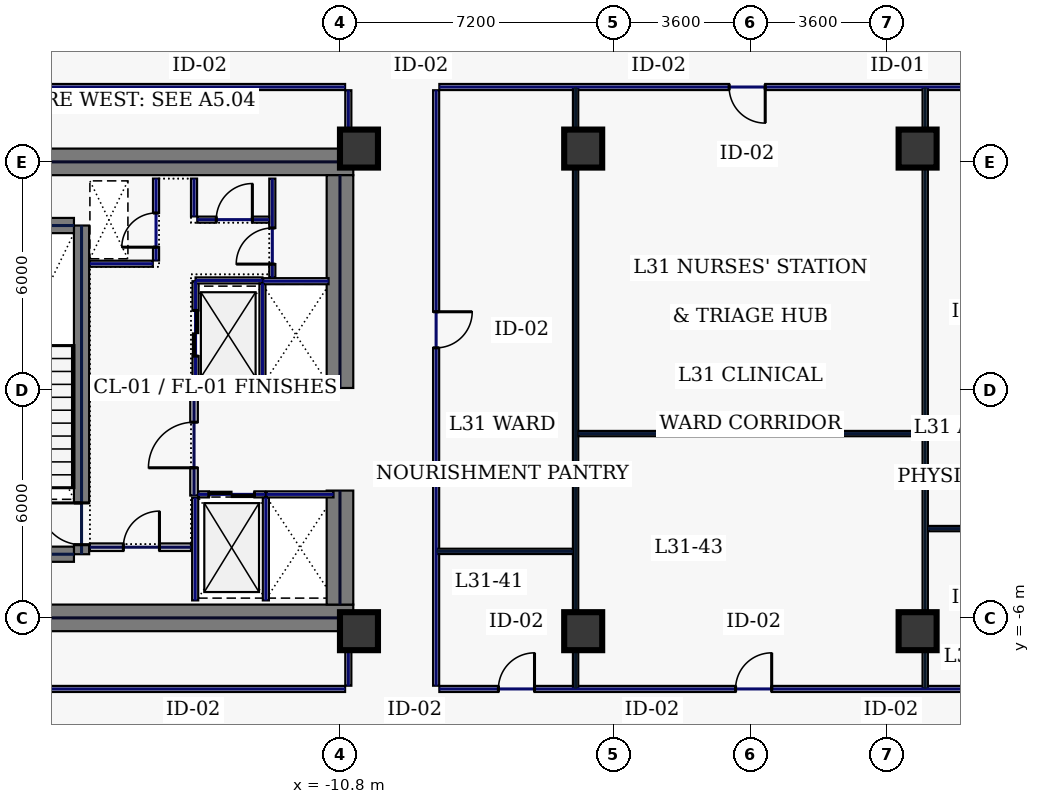
"""IFC4 building model, lengths in metres.
Left out: names, types, materials, properties, quantities, classifications, styles, units other than length and angle.
Written with IfcOpenShell. Run it as: python <this file> out.ifc"""

import sys

from ifc_helpers import new_model, si_unit, direction, frame, frame_2d, origin, origin_2d, place, context, subcontext, project, spatial, rectangle, hollow_rectangle, extrude, element, fill, save


model = new_model("IFC4")
c1 = context("Model", 3, precision=1e-05, world=origin(), true_north=direction((0.0, 1.0)))
c2 = subcontext(c1, "Body", "Model", "MODEL_VIEW")
j1 = project(units=[si_unit("LENGTHUNIT", "METRE"), si_unit("PLANEANGLEUNIT", "RADIAN")], contexts=[c1])
p1 = place(None, origin())
s1 = spatial("IfcSite", under=j1, at=p1, CompositionType="ELEMENT")
p2 = place(p1, origin())
s2 = spatial("IfcBuilding", under=s1, at=p2, CompositionType="ELEMENT")
p3 = place(p2, frame((0.0, 0.0, 137.4)))
s3 = spatial("IfcBuildingStorey", under=s2, at=p3, CompositionType="ELEMENT", Elevation=137.4)
for number, where, z_axis, x_axis in (
    (1, (-22.0, 6.0, 0.0), (0.0, 0.0, 1.0), (1.0, 0.0, 0.0)),
    (2, (-22.0, -6.0, 0.0), (0.0, 0.0, 1.0), (1.0, 0.0, 0.0)),
):
    element("IfcWall", number, at=place(p3, frame(where, z_axis=z_axis, x_axis=x_axis)), inside=s3, PredefinedType="SHEAR", context=c2, shape_type="SweptSolid", body=[
        extrude(rectangle(XDim=11.55, YDim=0.7, at=frame_2d((5.775, 0.0))), origin(), (0.0, 0.0, 1.0), 3.74),
    ])
p4 = place(p3, frame((-10.8, -5.65, 0.0), z_axis=(0.0, 0.0, 1.0), x_axis=(0.0, 1.0, 0.0)))
e3 = element("IfcWall", 3, at=p4, inside=s3, PredefinedType="SHEAR", context=c2, shape_type="SweptSolid", body=[
    extrude(rectangle(XDim=3.0, YDim=0.7, at=frame_2d((1.5, 0.0))), origin(), (0.0, 0.0, 1.0), 3.74),
])
p5 = place(p3, frame((-10.8, 0.05, 0.0), z_axis=(0.0, 0.0, 1.0), x_axis=(0.0, 1.0, 0.0)))
e4 = element("IfcWall", 4, at=p5, inside=s3, PredefinedType="SHEAR", context=c2, shape_type="SweptSolid", body=[
    extrude(rectangle(XDim=5.6, YDim=0.7, at=frame_2d((2.8, 0.0))), origin(), (0.0, 0.0, 1.0), 3.74),
])
p6 = place(p3, frame((-17.6, -4.325, 0.0), z_axis=(0.0, 0.0, 1.0), x_axis=(0.0, 1.0, 0.0)))
e5 = element("IfcWall", 5, at=p6, inside=s3, PredefinedType="SHEAR", context=c2, shape_type="SweptSolid", body=[
    extrude(rectangle(XDim=8.65, YDim=0.4, at=frame_2d((4.325, 0.0))), origin(), (0.0, 0.0, 1.0), 3.74),
])
p7 = place(p6, frame((0.25, 0.0, 0.0)))
e6 = element("IfcOpeningElement", 6, at=p7, cuts=e5, PredefinedType="OPENING", context=c2, shape_type="SweptSolid", body=[
    extrude(rectangle(XDim=1.1, YDim=2.2, at=frame_2d((0.55, 1.1))), frame((0.0, 0.21, 0.0), z_axis=(0.0, -1.0, 0.0), x_axis=(1.0, 0.0, 0.0)), (0.0, 0.0, 1.0), 0.42),
])
for number, where, z_axis, x_axis in (
    (7, (-21.2, -4.325, 0.0), (0.0, 0.0, 1.0), (1.0, 0.0, 0.0)),
    (8, (-21.2, 4.325, 0.0), (0.0, 0.0, 1.0), (1.0, 0.0, 0.0)),
):
    element("IfcWall", number, at=place(p3, frame(where, z_axis=z_axis, x_axis=x_axis)), inside=s3, PredefinedType="SHEAR", context=c2, shape_type="SweptSolid", body=[
        extrude(rectangle(XDim=3.4, YDim=0.4, at=frame_2d((1.7, 0.0))), origin(), (0.0, 0.0, 1.0), 3.74),
    ])
for number, where, z_axis, x_axis in (
    (9, (-10.3, -6.35, 0.0), (0.0, 0.0, 1.0), (1.0, 0.0, 0.0)),
    (10, (-10.3, 6.35, 0.0), (0.0, 0.0, 1.0), (1.0, 0.0, 0.0)),
    (11, (-4.4, -6.35, 0.0), (0.0, 0.0, 1.0), (1.0, 0.0, 0.0)),
    (12, (4.4, -6.35, 0.0), (0.0, 0.0, 1.0), (1.0, 0.0, 0.0)),
    (13, (-4.4, 6.35, 0.0), (0.0, 0.0, 1.0), (1.0, 0.0, 0.0)),
    (14, (4.4, 6.35, 0.0), (0.0, 0.0, 1.0), (1.0, 0.0, 0.0)),
):
    element("IfcColumn", number, at=place(p3, frame(where, z_axis=z_axis, x_axis=x_axis)), inside=s3, PredefinedType="COLUMN", context=c2, shape_type="SweptSolid", body=[
        extrude(hollow_rectangle(XDim=1.0, YDim=1.0, WallThickness=0.045, at=origin_2d()), origin(), (0.0, 0.0, 1.0), 3.74),
    ])
p8 = place(p3, frame((-14.6, 0.12, 0.0), z_axis=(0.0, 0.0, 1.0), x_axis=(0.0, 1.0, 0.0)))
e15 = element("IfcWall", 15, at=p8, inside=s3, PredefinedType="PARTITIONING", context=c2, shape_type="SweptSolid", body=[
    extrude(rectangle(XDim=2.74, YDim=0.16, at=frame_2d((1.37, 0.0))), origin(), (0.0, 0.0, 1.0), 3.74),
])
p9 = place(p8, frame((0.77, 0.0, 0.0)))
e16 = element("IfcOpeningElement", 16, at=p9, cuts=e15, PredefinedType="OPENING", context=c2, shape_type="SweptSolid", body=[
    extrude(rectangle(XDim=1.2, YDim=2.2, at=frame_2d((0.6, 1.1))), frame((0.0, 0.09, 0.0), z_axis=(0.0, -1.0, 0.0), x_axis=(1.0, 0.0, 0.0)), (0.0, 0.0, 1.0), 0.18),
])
for number, where, z_axis, x_axis in (
    (17, (-14.6, 0.1, 0.0), (0.0, 0.0, 1.0), (1.0, 0.0, 0.0)),
    (18, (-14.6, 2.88, 0.0), (0.0, 0.0, 1.0), (1.0, 0.0, 0.0)),
):
    element("IfcWall", number, at=place(p3, frame(where, z_axis=z_axis, x_axis=x_axis)), inside=s3, PredefinedType="PARTITIONING", context=c2, shape_type="SweptSolid", body=[
        extrude(rectangle(XDim=1.76, YDim=0.16, at=frame_2d((0.88, 0.0))), origin(), (0.0, 0.0, 1.0), 3.74),
    ])
p10 = place(p3, frame((-12.84, 0.18, 0.0), z_axis=(0.0, 0.0, 1.0), x_axis=(0.0, 1.0, 0.0)))
e19 = element("IfcWall", 19, at=p10, inside=s3, PredefinedType="PARTITIONING", context=c2, shape_type="SweptSolid", body=[
    extrude(rectangle(XDim=2.62, YDim=0.16, at=frame_2d((1.31, 0.0))), origin(), (0.0, 0.0, 1.0), 3.74),
])
p11 = place(p3, frame((-14.53, -2.75, 0.0), z_axis=(0.0, 0.0, 1.0), x_axis=(1.0, 0.0, 0.0)))
e20 = element("IfcWall", 20, at=p11, inside=s3, PredefinedType="PARTITIONING", context=c2, shape_type="SweptSolid", body=[
    extrude(rectangle(XDim=1.76, YDim=0.16, at=frame_2d((0.88, 0.0))), origin(), (0.0, 0.0, 1.0), 3.74),
])
p12 = place(p11, frame((0.28, 0.0, 0.0)))
e21 = element("IfcOpeningElement", 21, at=p12, cuts=e20, PredefinedType="OPENING", context=c2, shape_type="SweptSolid", body=[
    extrude(rectangle(XDim=1.2, YDim=2.2, at=frame_2d((0.6, 1.1))), frame((0.0, 0.09, 0.0), z_axis=(0.0, -1.0, 0.0), x_axis=(1.0, 0.0, 0.0)), (0.0, 0.0, 1.0), 0.18),
])
for number, where, z_axis, x_axis in (
    (22, (-12.75, -5.54, 0.0), (0.0, 0.0, 1.0), (0.0, 1.0, 0.0)),
    (23, (-14.61, -5.54, 0.0), (0.0, 0.0, 1.0), (0.0, 1.0, 0.0)),
):
    element("IfcWall", number, at=place(p3, frame(where, z_axis=z_axis, x_axis=x_axis)), inside=s3, PredefinedType="PARTITIONING", context=c2, shape_type="SweptSolid", body=[
        extrude(rectangle(XDim=2.7, YDim=0.16, at=frame_2d((1.35, 0.0))), origin(), (0.0, 0.0, 1.0), 3.74),
    ])
p13 = place(p3, frame((-12.73, -2.75, 0.0), z_axis=(0.0, 0.0, 1.0), x_axis=(1.0, 0.0, 0.0)))
e24 = element("IfcWall", 24, at=p13, inside=s3, PredefinedType="PARTITIONING", context=c2, shape_type="SweptSolid", body=[
    extrude(rectangle(XDim=1.76, YDim=0.16, at=frame_2d((0.88, 0.0))), origin(), (0.0, 0.0, 1.0), 3.74),
])
for number, where, z_axis, x_axis in (
    (25, (-12.82, 0.06, 0.0), (0.0, 0.0, 1.0), (1.0, 0.0, 0.0)),
    (26, (-12.82, 2.86, 0.0), (0.0, 0.0, 1.0), (1.0, 0.0, 0.0)),
):
    element("IfcWall", number, at=place(p3, frame(where, z_axis=z_axis, x_axis=x_axis)), inside=s3, PredefinedType="PARTITIONING", context=c2, shape_type="SweptSolid", body=[
        extrude(rectangle(XDim=1.72, YDim=0.16, at=frame_2d((0.86, 0.0))), origin(), (0.0, 0.0, 1.0), 3.74),
    ])
p14 = place(p3, frame((-15.64, 3.405, 0.0), z_axis=(0.0, 0.0, 1.0), x_axis=(0.0, 1.0, 0.0)))
e27 = element("IfcWall", 27, at=p14, inside=s3, PredefinedType="PARTITIONING", context=c2, shape_type="SweptSolid", body=[
    extrude(rectangle(XDim=2.155, YDim=0.16, at=frame_2d((1.078, 0.0))), origin(), (0.0, 0.0, 1.0), 3.74),
])
p15 = place(p14, frame((0.35, 0.0, 0.0)))
e28 = element("IfcOpeningElement", 28, at=p15, cuts=e27, PredefinedType="OPENING", context=c2, shape_type="SweptSolid", body=[
    extrude(rectangle(XDim=0.9, YDim=2.2, at=frame_2d((0.45, 1.1))), frame((0.0, 0.09, 0.0), z_axis=(0.0, -1.0, 0.0), x_axis=(1.0, 0.0, 0.0)), (0.0, 0.0, 1.0), 0.18),
])
p16 = place(p3, frame((-17.38, 3.32, 0.0), z_axis=(0.0, 0.0, 1.0), x_axis=(1.0, 0.0, 0.0)))
e29 = element("IfcWall", 29, at=p16, inside=s3, PredefinedType="PARTITIONING", context=c2, shape_type="SweptSolid", body=[
    extrude(rectangle(XDim=1.655, YDim=0.16, at=frame_2d((0.827, 0.0))), origin(), (0.0, 0.0, 1.0), 3.74),
])
p17 = place(p3, frame((-17.38, -4.14, 0.0), z_axis=(0.0, 0.0, 1.0), x_axis=(1.0, 0.0, 0.0)))
e30 = element("IfcWall", 30, at=p17, inside=s3, PredefinedType="SOLIDWALL", context=c2, shape_type="SweptSolid", body=[
    extrude(rectangle(XDim=2.66, YDim=0.2, at=frame_2d((1.33, 0.0))), origin(), (0.0, 0.0, 1.0), 3.74),
])
p18 = place(p17, frame((0.88, 0.0, 0.0)))
e31 = element("IfcOpeningElement", 31, at=p18, cuts=e30, PredefinedType="OPENING", context=c2, shape_type="SweptSolid", body=[
    extrude(rectangle(XDim=0.95, YDim=2.2, at=frame_2d((0.475, 1.1))), frame((0.0, 0.11, 0.0), z_axis=(0.0, -1.0, 0.0), x_axis=(1.0, 0.0, 0.0)), (0.0, 0.0, 1.0), 0.22),
])
p19 = place(p3, frame((-12.58, 2.96, 0.0), z_axis=(0.0, 0.0, 1.0), x_axis=(0.0, 1.0, 0.0)))
e32 = element("IfcWall", 32, at=p19, inside=s3, PredefinedType="PARTITIONING", context=c2, shape_type="SweptSolid", body=[
    extrude(rectangle(XDim=2.6, YDim=0.16, at=frame_2d((1.3, 0.0))), origin(), (0.0, 0.0, 1.0), 3.74),
])
p20 = place(p19, frame((0.35, 0.0, 0.0)))
e33 = element("IfcOpeningElement", 33, at=p20, cuts=e32, PredefinedType="OPENING", context=c2, shape_type="SweptSolid", body=[
    extrude(rectangle(XDim=0.95, YDim=2.2, at=frame_2d((0.475, 1.1))), frame((0.0, 0.09, 0.0), z_axis=(0.0, -1.0, 0.0), x_axis=(1.0, 0.0, 0.0)), (0.0, 0.0, 1.0), 0.18),
])
p21 = place(p3, frame((-14.555, 4.48, 0.0), z_axis=(0.0, 0.0, 1.0), x_axis=(1.0, 0.0, 0.0)))
e34 = element("IfcWall", 34, at=p21, inside=s3, PredefinedType="PARTITIONING", context=c2, shape_type="SweptSolid", body=[
    extrude(rectangle(XDim=1.89, YDim=0.16, at=frame_2d((0.945, 0.0))), origin(), (0.0, 0.0, 1.0), 3.74),
])
p22 = place(p21, frame((0.5, 0.0, 0.0)))
e35 = element("IfcOpeningElement", 35, at=p22, cuts=e34, PredefinedType="OPENING", context=c2, shape_type="SweptSolid", body=[
    extrude(rectangle(XDim=0.95, YDim=2.2, at=frame_2d((0.475, 1.1))), frame((0.0, 0.09, 0.0), z_axis=(0.0, -1.0, 0.0), x_axis=(1.0, 0.0, 0.0)), (0.0, 0.0, 1.0), 0.18),
])
p23 = place(p3, frame((-14.64, 4.565, 0.0), z_axis=(0.0, 0.0, 1.0), x_axis=(0.0, 1.0, 0.0)))
e36 = element("IfcWall", 36, at=p23, inside=s3, PredefinedType="PARTITIONING", context=c2, shape_type="SweptSolid", body=[
    extrude(rectangle(XDim=0.995, YDim=0.16, at=frame_2d((0.498, 0.0))), origin(), (0.0, 0.0, 1.0), 3.74),
])
p24 = place(p3, frame((-14.64, -2.78, 0.0), z_axis=(0.0, 0.0, 1.0), x_axis=(0.0, 1.0, 0.0)))
e37 = element("IfcWall", 37, at=p24, inside=s3, PredefinedType="SOLIDWALL", context=c2, shape_type="SweptSolid", body=[
    extrude(rectangle(XDim=2.82, YDim=0.2, at=frame_2d((1.41, 0.0))), origin(), (0.0, 0.0, 1.0), 3.74),
])
p25 = place(p24, frame((0.73, 0.0, 0.0)))
e38 = element("IfcOpeningElement", 38, at=p25, cuts=e37, PredefinedType="OPENING", context=c2, shape_type="SweptSolid", body=[
    extrude(rectangle(XDim=1.2, YDim=2.2, at=frame_2d((0.6, 1.1))), frame((0.0, 0.11, 0.0), z_axis=(0.0, -1.0, 0.0), x_axis=(1.0, 0.0, 0.0)), (0.0, 0.0, 1.0), 0.22),
])
p26 = place(p3, frame((8.185, 7.97, 0.0), z_axis=(0.0, 0.0, 1.0), x_axis=(-1.0, 0.0, 0.0)))
e39 = element("IfcWall", 39, at=p26, inside=s3, PredefinedType="PARTITIONING", context=c2, shape_type="SweptSolid", body=[
    extrude(rectangle(XDim=16.37, YDim=0.16, at=frame_2d((8.185, 0.0))), origin(), (0.0, 0.0, 1.0), 3.74),
])
p27 = place(p26, frame((7.795, 0.0, 0.0)))
e40 = element("IfcOpeningElement", 40, at=p27, cuts=e39, PredefinedType="OPENING", context=c2, shape_type="SweptSolid", body=[
    extrude(rectangle(XDim=0.95, YDim=2.2, at=frame_2d((0.475, 1.1))), frame((0.0, 0.09, 0.0), z_axis=(0.0, -1.0, 0.0), x_axis=(1.0, 0.0, 0.0)), (0.0, 0.0, 1.0), 0.18),
])
p28 = place(p3, frame((-8.27, 7.885, 0.0), z_axis=(0.0, 0.0, 1.0), x_axis=(0.0, -1.0, 0.0)))
e41 = element("IfcWall", 41, at=p28, inside=s3, PredefinedType="PARTITIONING", context=c2, shape_type="SweptSolid", body=[
    extrude(rectangle(XDim=15.67, YDim=0.16, at=frame_2d((7.835, 0.0))), origin(), (0.0, 0.0, 1.0), 3.74),
])
p29 = place(p28, frame((5.829, 0.0, 0.0)))
e42 = element("IfcOpeningElement", 42, at=p29, cuts=e41, PredefinedType="OPENING", context=c2, shape_type="SweptSolid", body=[
    extrude(rectangle(XDim=0.95, YDim=2.2, at=frame_2d((0.475, 1.1))), frame((0.0, 0.09, 0.0), z_axis=(0.0, -1.0, 0.0), x_axis=(1.0, 0.0, 0.0)), (0.0, 0.0, 1.0), 0.18),
])
p30 = place(p3, frame((-8.185, -7.87, 0.0), z_axis=(0.0, 0.0, 1.0), x_axis=(1.0, 0.0, 0.0)))
e43 = element("IfcWall", 43, at=p30, inside=s3, PredefinedType="PARTITIONING", context=c2, shape_type="SweptSolid", body=[
    extrude(rectangle(XDim=16.37, YDim=0.16, at=frame_2d((8.185, 0.0))), origin(), (0.0, 0.0, 1.0), 3.74),
])
p31 = place(p30, frame((1.554, 0.0, 0.0)))
e44 = element("IfcOpeningElement", 44, at=p31, cuts=e43, PredefinedType="OPENING", context=c2, shape_type="SweptSolid", body=[
    extrude(rectangle(XDim=0.95, YDim=2.2, at=frame_2d((0.475, 1.1))), frame((0.0, 0.09, 0.0), z_axis=(0.0, -1.0, 0.0), x_axis=(1.0, 0.0, 0.0)), (0.0, 0.0, 1.0), 0.18),
])
p32 = place(p30, frame((7.795, 0.0, 0.0)))
e45 = element("IfcOpeningElement", 45, at=p32, cuts=e43, PredefinedType="OPENING", context=c2, shape_type="SweptSolid", body=[
    extrude(rectangle(XDim=0.95, YDim=2.2, at=frame_2d((0.475, 1.1))), frame((0.0, 0.09, 0.0), z_axis=(0.0, -1.0, 0.0), x_axis=(1.0, 0.0, 0.0)), (0.0, 0.0, 1.0), 0.18),
])
p33 = place(p3, frame((-10.58, -7.785, 0.0), z_axis=(0.0, 0.0, 1.0), x_axis=(0.0, 1.0, 0.0)))
e46 = element("IfcWall", 46, at=p33, inside=s3, PredefinedType="PARTITIONING", context=c2, shape_type="SweptSolid", body=[
    extrude(rectangle(XDim=1.365, YDim=0.16, at=frame_2d((0.683, 0.0))), origin(), (0.0, 0.0, 1.0), 3.74),
])
p34 = place(p3, frame((-10.58, 6.42, 0.0), z_axis=(0.0, 0.0, 1.0), x_axis=(0.0, 1.0, 0.0)))
e47 = element("IfcWall", 47, at=p34, inside=s3, PredefinedType="PARTITIONING", context=c2, shape_type="SweptSolid", body=[
    extrude(rectangle(XDim=1.465, YDim=0.16, at=frame_2d((0.732, 0.0))), origin(), (0.0, 0.0, 1.0), 3.74),
])
for number, where, z_axis, x_axis in (
    (48, (-10.665, 7.97, 0.0), (0.0, 0.0, 1.0), (-1.0, 0.0, 0.0)),
    (49, (-25.235, -7.87, 0.0), (0.0, 0.0, 1.0), (1.0, 0.0, 0.0)),
):
    element("IfcWall", number, at=place(p3, frame(where, z_axis=z_axis, x_axis=x_axis)), inside=s3, PredefinedType="PARTITIONING", context=c2, shape_type="SweptSolid", body=[
        extrude(rectangle(XDim=14.57, YDim=0.16, at=frame_2d((7.285, 0.0))), origin(), (0.0, 0.0, 1.0), 3.74),
    ])
for number, where, z_axis, x_axis in (
    (50, (-4.6, -7.865, 0.0), (0.0, 0.0, 1.0), (0.0, 1.0, 0.0)),
    (51, (4.6, -7.865, 0.0), (0.0, 0.0, 1.0), (0.0, 1.0, 0.0)),
):
    element("IfcWall", number, at=place(p3, frame(where, z_axis=z_axis, x_axis=x_axis)), inside=s3, PredefinedType="PARTITIONING", context=c2, shape_type="SweptSolid", body=[
        extrude(rectangle(XDim=15.83, YDim=0.14, at=frame_2d((7.915, 0.0))), origin(), (0.0, 0.0, 1.0), 2.935),
    ])
p35 = place(p3, frame((-4.525, -1.15, 0.0), z_axis=(0.0, 0.0, 1.0), x_axis=(1.0, 0.0, 0.0)))
e52 = element("IfcWall", 52, at=p35, inside=s3, PredefinedType="PARTITIONING", context=c2, shape_type="SweptSolid", body=[
    extrude(rectangle(XDim=9.05, YDim=0.14, at=frame_2d((4.525, 0.0))), origin(), (0.0, 0.0, 1.0), 3.74),
])
for number, where, z_axis, x_axis in (
    (53, (-8.265, -4.25, 0.0), (0.0, 0.0, 1.0), (1.0, 0.0, 0.0)),
    (54, (4.675, -3.65, 0.0), (0.0, 0.0, 1.0), (1.0, 0.0, 0.0)),
):
    element("IfcWall", number, at=place(p3, frame(where, z_axis=z_axis, x_axis=x_axis)), inside=s3, PredefinedType="PARTITIONING", context=c2, shape_type="SweptSolid", body=[
        extrude(rectangle(XDim=3.59, YDim=0.14, at=frame_2d((1.795, 0.0))), origin(), (0.0, 0.0, 1.0), 3.74),
    ])
p36 = place(p7, origin())
e55 = element("IfcDoor", 55, at=p36, inside=s3, OperationType="SINGLE_SWING_RIGHT", PredefinedType="DOOR", context=c2, shape_type="SweptSolid", body=[
    extrude(rectangle(XDim=1.1, YDim=2.2, at=frame_2d((0.55, 1.1))), frame((0.0, 0.025, 0.0), z_axis=(0.0, -1.0, 0.0), x_axis=(1.0, 0.0, 0.0)), (0.0, 0.0, 1.0), 0.05),
])
fill(e6, e55)
p37 = place(p9, origin())
e56 = element("IfcDoor", 56, at=p37, inside=s3, OperationType="SLIDING_TO_LEFT", PredefinedType="DOOR", context=c2, shape_type="SweptSolid", body=[
    extrude(rectangle(XDim=1.2, YDim=2.2, at=frame_2d((0.6, 1.1))), frame((0.0, 0.025, 0.0), z_axis=(0.0, -1.0, 0.0), x_axis=(1.0, 0.0, 0.0)), (0.0, 0.0, 1.0), 0.05),
])
fill(e16, e56)
p38 = place(p12, origin())
e57 = element("IfcDoor", 57, at=p38, inside=s3, OperationType="SLIDING_TO_LEFT", PredefinedType="DOOR", context=c2, shape_type="SweptSolid", body=[
    extrude(rectangle(XDim=1.2, YDim=2.2, at=frame_2d((0.6, 1.1))), frame((0.0, 0.025, 0.0), z_axis=(0.0, -1.0, 0.0), x_axis=(1.0, 0.0, 0.0)), (0.0, 0.0, 1.0), 0.05),
])
fill(e21, e57)
p39 = place(p15, origin())
e58 = element("IfcDoor", 58, at=p39, inside=s3, OperationType="SINGLE_SWING_LEFT", PredefinedType="DOOR", context=c2, shape_type="SweptSolid", body=[
    extrude(rectangle(XDim=0.9, YDim=2.2, at=frame_2d((0.45, 1.1))), frame((0.0, 0.025, 0.0), z_axis=(0.0, -1.0, 0.0), x_axis=(1.0, 0.0, 0.0)), (0.0, 0.0, 1.0), 0.05),
])
fill(e28, e58)
p40 = place(p18, origin())
e59 = element("IfcDoor", 59, at=p40, inside=s3, OperationType="SINGLE_SWING_RIGHT", PredefinedType="DOOR", context=c2, shape_type="SweptSolid", body=[
    extrude(rectangle(XDim=0.95, YDim=2.2, at=frame_2d((0.475, 1.1))), frame((0.0, 0.025, 0.0), z_axis=(0.0, -1.0, 0.0), x_axis=(1.0, 0.0, 0.0)), (0.0, 0.0, 1.0), 0.05),
])
fill(e31, e59)
p41 = place(p20, origin())
e60 = element("IfcDoor", 60, at=p41, inside=s3, OperationType="SINGLE_SWING_LEFT", PredefinedType="DOOR", context=c2, shape_type="SweptSolid", body=[
    extrude(rectangle(XDim=0.95, YDim=2.2, at=frame_2d((0.475, 1.1))), frame((0.0, 0.025, 0.0), z_axis=(0.0, -1.0, 0.0), x_axis=(1.0, 0.0, 0.0)), (0.0, 0.0, 1.0), 0.05),
])
fill(e33, e60)
p42 = place(p22, origin())
e61 = element("IfcDoor", 61, at=p42, inside=s3, OperationType="SINGLE_SWING_RIGHT", PredefinedType="DOOR", context=c2, shape_type="SweptSolid", body=[
    extrude(rectangle(XDim=0.95, YDim=2.2, at=frame_2d((0.475, 1.1))), frame((0.0, 0.025, 0.0), z_axis=(0.0, -1.0, 0.0), x_axis=(1.0, 0.0, 0.0)), (0.0, 0.0, 1.0), 0.05),
])
fill(e35, e61)
p43 = place(p25, origin())
e62 = element("IfcDoor", 62, at=p43, inside=s3, OperationType="SINGLE_SWING_LEFT", PredefinedType="DOOR", context=c2, shape_type="SweptSolid", body=[
    extrude(rectangle(XDim=1.2, YDim=2.2, at=frame_2d((0.6, 1.1))), frame((0.0, 0.025, 0.0), z_axis=(0.0, -1.0, 0.0), x_axis=(1.0, 0.0, 0.0)), (0.0, 0.0, 1.0), 0.05),
])
fill(e38, e62)
p44 = place(p31, origin())
e63 = element("IfcDoor", 63, at=p44, inside=s3, OperationType="SINGLE_SWING_RIGHT", PredefinedType="DOOR", context=c2, shape_type="SweptSolid", body=[
    extrude(rectangle(XDim=0.95, YDim=2.2, at=frame_2d((0.475, 1.1))), frame((0.0, 0.025, 0.0), z_axis=(0.0, -1.0, 0.0), x_axis=(1.0, 0.0, 0.0)), (0.0, 0.0, 1.0), 0.05),
])
fill(e44, e63)
p45 = place(p29, origin())
e64 = element("IfcDoor", 64, at=p45, inside=s3, OperationType="SINGLE_SWING_LEFT", PredefinedType="DOOR", context=c2, shape_type="SweptSolid", body=[
    extrude(rectangle(XDim=0.95, YDim=2.2, at=frame_2d((0.475, 1.1))), frame((0.0, 0.025, 0.0), z_axis=(0.0, -1.0, 0.0), x_axis=(1.0, 0.0, 0.0)), (0.0, 0.0, 1.0), 0.05),
])
fill(e42, e64)
p46 = place(p32, origin())
e65 = element("IfcDoor", 65, at=p46, inside=s3, OperationType="SINGLE_SWING_RIGHT", PredefinedType="DOOR", context=c2, shape_type="SweptSolid", body=[
    extrude(rectangle(XDim=0.95, YDim=2.2, at=frame_2d((0.475, 1.1))), frame((0.0, 0.025, 0.0), z_axis=(0.0, -1.0, 0.0), x_axis=(1.0, 0.0, 0.0)), (0.0, 0.0, 1.0), 0.05),
])
fill(e45, e65)
p47 = place(p27, origin())
e66 = element("IfcDoor", 66, at=p47, inside=s3, OperationType="SINGLE_SWING_LEFT", PredefinedType="DOOR", context=c2, shape_type="SweptSolid", body=[
    extrude(rectangle(XDim=0.95, YDim=2.2, at=frame_2d((0.475, 1.1))), frame((0.0, 0.025, 0.0), z_axis=(0.0, -1.0, 0.0), x_axis=(1.0, 0.0, 0.0)), (0.0, 0.0, 1.0), 0.05),
])
fill(e40, e66)
save(model, sys.argv[1])
